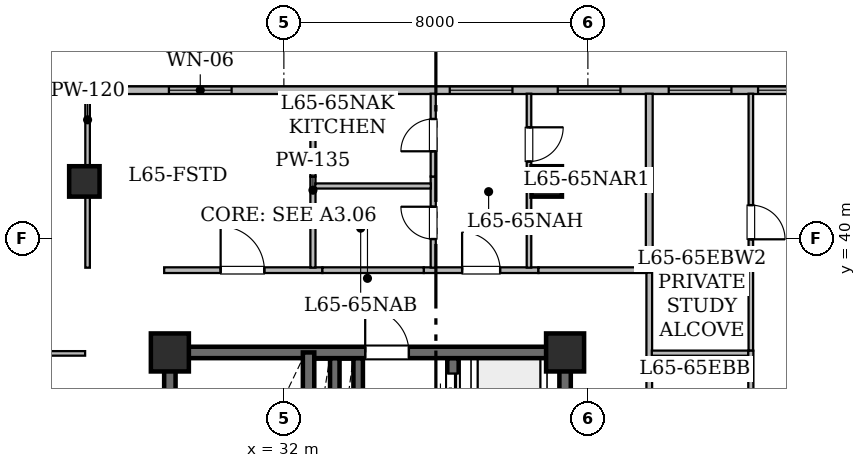
"""IFC4 building model, lengths in metres.
Left out: names, types, materials, properties, quantities, classifications, styles, units other than length and angle.
Written with IfcOpenShell. Run it as: python <this file> out.ifc"""

import sys

from ifc_helpers import new_model, si_unit, direction, frame, frame_2d, origin, origin_2d, place, context, subcontext, project, spatial, rectangle, hollow_rectangle, extrude, element, fill, save


model = new_model("IFC4")
c1 = context("Model", 3, precision=1e-05, world=origin(), true_north=direction((0.0, 1.0)))
c2 = subcontext(c1, "Body", "Model", "MODEL_VIEW")
j1 = project(units=[si_unit("LENGTHUNIT", "METRE"), si_unit("PLANEANGLEUNIT", "RADIAN")], contexts=[c1])
p1 = place(None, origin())
s1 = spatial("IfcSite", under=j1, at=p1, CompositionType="ELEMENT")
p2 = place(p1, origin())
s2 = spatial("IfcBuilding", under=s1, at=p2, CompositionType="ELEMENT")
p3 = place(p2, frame((0.0, 0.0, 253.7)))
s3 = spatial("IfcBuildingStorey", under=s2, at=p3, CompositionType="ELEMENT", Elevation=253.7)
for number, where, z_axis, x_axis in (
    (1, (29.0, 37.0, 0.0), (0.0, 0.0, 1.0), (1.0, 0.0, 0.0)),
    (2, (39.4, 37.0, 0.0), (0.0, 0.0, 1.0), (1.0, 0.0, 0.0)),
):
    element("IfcColumn", number, at=place(p3, frame(where, z_axis=z_axis, x_axis=x_axis)), inside=s3, PredefinedType="COLUMN", context=c2, shape_type="SweptSolid", body=[
        extrude(hollow_rectangle(XDim=1.0, YDim=1.0, WallThickness=0.05, at=origin_2d()), origin(), (0.0, 0.0, 1.0), 3.65),
    ])
for number, where, z_axis, x_axis in (
    (3, (26.75, 41.5, 0.0), (0.0, 0.0, 1.0), (1.0, 0.0, 0.0)),
    (4, (38.917, 41.5, 0.0), (0.0, 0.0, 1.0), (1.0, 0.0, 0.0)),
):
    element("IfcColumn", number, at=place(p3, frame(where, z_axis=z_axis, x_axis=x_axis)), inside=s3, PredefinedType="COLUMN", context=c2, shape_type="SweptSolid", body=[
        extrude(hollow_rectangle(XDim=0.8, YDim=0.8, WallThickness=0.04, at=origin_2d()), origin(), (0.0, 0.0, 1.0), 3.65),
    ])
p4 = place(p3, frame((24.302, 43.9, 0.0), z_axis=(0.0, 0.0, 1.0), x_axis=(1.0, 0.0, 0.0)))
e5 = element("IfcWall", 5, at=p4, inside=s3, PredefinedType="STANDARD", context=c2, shape_type="SweptSolid", body=[
    extrude(rectangle(XDim=41.457, YDim=0.2, at=frame_2d((20.729, 0.0))), origin(), (0.0, 0.0, 1.0), 3.43),
])
p5 = place(p4, frame((4.673, 0.0, 0.85)))
e6 = element("IfcOpeningElement", 6, at=p5, cuts=e5, PredefinedType="OPENING", context=c2, shape_type="SweptSolid", body=[
    extrude(rectangle(XDim=1.65, YDim=1.55, at=frame_2d((0.825, 0.775))), frame((0.0, 0.11, 0.0), z_axis=(0.0, -1.0, 0.0), x_axis=(1.0, 0.0, 0.0)), (0.0, 0.0, 1.0), 0.22),
])
p6 = place(p4, frame((12.063, 0.0, 0.85)))
e7 = element("IfcOpeningElement", 7, at=p6, cuts=e5, PredefinedType="OPENING", context=c2, shape_type="SweptSolid", body=[
    extrude(rectangle(XDim=1.65, YDim=1.55, at=frame_2d((0.825, 0.775))), frame((0.0, 0.11, 0.0), z_axis=(0.0, -1.0, 0.0), x_axis=(1.0, 0.0, 0.0)), (0.0, 0.0, 1.0), 0.22),
])
p7 = place(p4, frame((14.905, 0.0, 0.85)))
e8 = element("IfcOpeningElement", 8, at=p7, cuts=e5, PredefinedType="OPENING", context=c2, shape_type="SweptSolid", body=[
    extrude(rectangle(XDim=1.65, YDim=1.55, at=frame_2d((0.825, 0.775))), frame((0.0, 0.11, 0.0), z_axis=(0.0, -1.0, 0.0), x_axis=(1.0, 0.0, 0.0)), (0.0, 0.0, 1.0), 0.22),
])
p8 = place(p4, frame((17.825, 0.0, 0.85)))
e9 = element("IfcOpeningElement", 9, at=p8, cuts=e5, PredefinedType="OPENING", context=c2, shape_type="SweptSolid", body=[
    extrude(rectangle(XDim=1.65, YDim=1.55, at=frame_2d((0.825, 0.775))), frame((0.0, 0.11, 0.0), z_axis=(0.0, -1.0, 0.0), x_axis=(1.0, 0.0, 0.0)), (0.0, 0.0, 1.0), 0.22),
])
p9 = place(p4, frame((20.176, 0.0, 0.8)))
e10 = element("IfcOpeningElement", 10, at=p9, cuts=e5, PredefinedType="OPENING", context=c2, shape_type="SweptSolid", body=[
    extrude(rectangle(XDim=1.2, YDim=1.5, at=frame_2d((0.6, 0.75))), frame((0.0, 0.11, 0.0), z_axis=(0.0, -1.0, 0.0), x_axis=(1.0, 0.0, 0.0)), (0.0, 0.0, 1.0), 0.22),
])
p10 = place(p4, frame((23.266, 0.0, 0.85)))
e11 = element("IfcOpeningElement", 11, at=p10, cuts=e5, PredefinedType="OPENING", context=c2, shape_type="SweptSolid", body=[
    extrude(rectangle(XDim=1.65, YDim=1.55, at=frame_2d((0.825, 0.775))), frame((0.0, 0.11, 0.0), z_axis=(0.0, -1.0, 0.0), x_axis=(1.0, 0.0, 0.0)), (0.0, 0.0, 1.0), 0.22),
])
p11 = place(p4, frame((27.324, 0.0, 0.85)))
e12 = element("IfcOpeningElement", 12, at=p11, cuts=e5, PredefinedType="OPENING", context=c2, shape_type="SweptSolid", body=[
    extrude(rectangle(XDim=1.65, YDim=1.55, at=frame_2d((0.825, 0.775))), frame((0.0, 0.11, 0.0), z_axis=(0.0, -1.0, 0.0), x_axis=(1.0, 0.0, 0.0)), (0.0, 0.0, 1.0), 0.22),
])
p12 = place(p4, frame((32.408, 0.0, 0.85)))
e13 = element("IfcOpeningElement", 13, at=p12, cuts=e5, PredefinedType="OPENING", context=c2, shape_type="SweptSolid", body=[
    extrude(rectangle(XDim=1.65, YDim=1.55, at=frame_2d((0.825, 0.775))), frame((0.0, 0.11, 0.0), z_axis=(0.0, -1.0, 0.0), x_axis=(1.0, 0.0, 0.0)), (0.0, 0.0, 1.0), 0.22),
])
p13 = place(p3, frame((29.0, 28.0, 0.0), z_axis=(0.0, 0.0, 1.0), x_axis=(0.0, 1.0, 0.0)))
e14 = element("IfcWall", 14, at=p13, inside=s3, PredefinedType="SHEAR", context=c2, shape_type="SweptSolid", body=[
    extrude(rectangle(XDim=9.0, YDim=0.3, at=frame_2d((4.5, 0.0))), origin(), (0.0, 0.0, 1.0), 3.43),
])
p14 = place(p3, frame((29.0, 37.0, 0.0), z_axis=(0.0, 0.0, 1.0), x_axis=(1.0, 0.0, 0.0)))
e15 = element("IfcWall", 15, at=p14, inside=s3, PredefinedType="SHEAR", context=c2, shape_type="SweptSolid", body=[
    extrude(rectangle(XDim=10.4, YDim=0.3, at=frame_2d((5.2, 0.0))), origin(), (0.0, 0.0, 1.0), 3.43),
])
p15 = place(p14, frame((5.14, 0.0, 0.0)))
e16 = element("IfcOpeningElement", 16, at=p15, cuts=e15, PredefinedType="OPENING", context=c2, shape_type="SweptSolid", body=[
    extrude(rectangle(XDim=1.15, YDim=2.2, at=frame_2d((0.575, 1.1))), frame((0.0, 0.16, 0.0), z_axis=(0.0, -1.0, 0.0), x_axis=(1.0, 0.0, 0.0)), (0.0, 0.0, 1.0), 0.32),
])
p16 = place(p3, frame((39.4, 24.4, 0.0), z_axis=(0.0, 0.0, 1.0), x_axis=(0.0, 1.0, 0.0)))
e17 = element("IfcWall", 17, at=p16, inside=s3, PredefinedType="SHEAR", context=c2, shape_type="SweptSolid", body=[
    extrude(rectangle(XDim=12.6, YDim=0.3, at=frame_2d((6.3, 0.0))), origin(), (0.0, 0.0, 1.0), 3.43),
])
p17 = place(p3, frame((32.65, 28.0, 0.0), z_axis=(0.0, 0.0, 1.0), x_axis=(0.0, 1.0, 0.0)))
e18 = element("IfcWall", 18, at=p17, inside=s3, PredefinedType="SHEAR", context=c2, shape_type="SweptSolid", body=[
    extrude(rectangle(XDim=9.0, YDim=0.3, at=frame_2d((4.5, 0.0))), origin(), (0.0, 0.0, 1.0), 3.43),
])
p18 = place(p17, frame((0.72, 0.0, 0.0)))
e19 = element("IfcOpeningElement", 19, at=p18, cuts=e18, PredefinedType="OPENING", context=c2, shape_type="SweptSolid", body=[
    extrude(rectangle(XDim=1.0, YDim=2.15, at=frame_2d((0.5, 1.075))), frame((0.0, 0.16, 0.0), z_axis=(0.0, -1.0, 0.0), x_axis=(1.0, 0.0, 0.0)), (0.0, 0.0, 1.0), 0.32),
])
p19 = place(p3, frame((36.45, 31.25, 0.0), z_axis=(0.0, 0.0, 1.0), x_axis=(0.0, 1.0, 0.0)))
e20 = element("IfcWall", 20, at=p19, inside=s3, PredefinedType="SHEAR", context=c2, shape_type="SweptSolid", body=[
    extrude(rectangle(XDim=5.596, YDim=0.3, at=frame_2d((2.798, 0.0))), origin(), (0.0, 0.0, 1.0), 3.43),
])
p20 = place(p19, frame((0.12, 0.0, 0.0)))
e21 = element("IfcOpeningElement", 21, at=p20, cuts=e20, PredefinedType="OPENING", context=c2, shape_type="SweptSolid", body=[
    extrude(rectangle(XDim=1.05, YDim=2.15, at=frame_2d((0.525, 1.075))), frame((0.0, 0.16, 0.0), z_axis=(0.0, -1.0, 0.0), x_axis=(1.0, 0.0, 0.0)), (0.0, 0.0, 1.0), 0.32),
])
p21 = place(p19, frame((2.125, 0.0, 0.0)))
e22 = element("IfcOpeningElement", 22, at=p21, cuts=e20, PredefinedType="OPENING", context=c2, shape_type="SweptSolid", body=[
    extrude(rectangle(XDim=1.05, YDim=2.15, at=frame_2d((0.525, 1.075))), frame((0.0, 0.16, 0.0), z_axis=(0.0, -1.0, 0.0), x_axis=(1.0, 0.0, 0.0)), (0.0, 0.0, 1.0), 0.32),
])
p22 = place(p19, frame((4.145, 0.0, 0.0)))
e23 = element("IfcOpeningElement", 23, at=p22, cuts=e20, PredefinedType="OPENING", context=c2, shape_type="SweptSolid", body=[
    extrude(rectangle(XDim=1.05, YDim=2.15, at=frame_2d((0.525, 1.075))), frame((0.0, 0.16, 0.0), z_axis=(0.0, -1.0, 0.0), x_axis=(1.0, 0.0, 0.0)), (0.0, 0.0, 1.0), 0.32),
])
p23 = place(p3, frame((33.955, 34.025, 0.0), z_axis=(0.0, 0.0, 1.0), x_axis=(0.0, 1.0, 0.0)))
e24 = element("IfcWall", 24, at=p23, inside=s3, PredefinedType="SHEAR", context=c2, shape_type="SweptSolid", body=[
    extrude(rectangle(XDim=2.821, YDim=0.25, at=frame_2d((1.411, 0.0))), origin(), (0.0, 0.0, 1.0), 3.43),
])
p24 = place(p3, frame((33.34, 34.279, 0.0), z_axis=(0.0, 0.0, 1.0), x_axis=(0.0, 1.0, 0.0)))
e25 = element("IfcWall", 25, at=p24, inside=s3, PredefinedType="SHEAR", context=c2, shape_type="SweptSolid", body=[
    extrude(rectangle(XDim=2.567, YDim=0.25, at=frame_2d((1.283, 0.0))), origin(), (0.0, 0.0, 1.0), 3.43),
])
p25 = place(p3, frame((28.85, 39.165, 0.0), z_axis=(0.0, 0.0, 1.0), x_axis=(1.0, 0.0, 0.0)))
e26 = element("IfcWall", 26, at=p25, inside=s3, PredefinedType="STANDARD", context=c2, shape_type="SweptSolid", body=[
    extrude(rectangle(XDim=4.164, YDim=0.15, at=frame_2d((2.082, 0.0))), origin(), (0.0, 0.0, 1.0), 3.43),
])
p26 = place(p25, frame((1.486, 0.0, 0.0)))
e27 = element("IfcOpeningElement", 27, at=p26, cuts=e26, PredefinedType="OPENING", context=c2, shape_type="SweptSolid", body=[
    extrude(rectangle(XDim=1.15, YDim=2.2, at=frame_2d((0.575, 1.1))), frame((0.0, 0.085, 0.0), z_axis=(0.0, -1.0, 0.0), x_axis=(1.0, 0.0, 0.0)), (0.0, 0.0, 1.0), 0.17),
])
p27 = place(p3, frame((35.681, 39.165, 0.0), z_axis=(0.0, 0.0, 1.0), x_axis=(1.0, 0.0, 0.0)))
e28 = element("IfcWall", 28, at=p27, inside=s3, PredefinedType="STANDARD", context=c2, shape_type="SweptSolid", body=[
    extrude(rectangle(XDim=3.018, YDim=0.15, at=frame_2d((1.509, 0.0))), origin(), (0.0, 0.0, 1.0), 3.43),
])
p28 = place(p27, frame((1.009, 0.0, 0.0)))
e29 = element("IfcOpeningElement", 29, at=p28, cuts=e28, PredefinedType="OPENING", context=c2, shape_type="SweptSolid", body=[
    extrude(rectangle(XDim=1.0, YDim=2.15, at=frame_2d((0.5, 1.075))), frame((0.0, 0.085, 0.0), z_axis=(0.0, -1.0, 0.0), x_axis=(1.0, 0.0, 0.0)), (0.0, 0.0, 1.0), 0.17),
])
p29 = place(p3, frame((33.014, 39.165, 0.0), z_axis=(0.0, 0.0, 1.0), x_axis=(1.0, 0.0, 0.0)))
e30 = element("IfcWall", 30, at=p29, inside=s3, PredefinedType="STANDARD", context=c2, shape_type="SweptSolid", body=[
    extrude(rectangle(XDim=2.667, YDim=0.15, at=frame_2d((1.333, 0.0))), origin(), (0.0, 0.0, 1.0), 3.43),
])
p30 = place(p3, frame((38.699, 39.165, 0.0), z_axis=(0.0, 0.0, 1.0), x_axis=(1.0, 0.0, 0.0)))
e31 = element("IfcWall", 31, at=p30, inside=s3, PredefinedType="STANDARD", context=c2, shape_type="SweptSolid", body=[
    extrude(rectangle(XDim=2.851, YDim=0.15, at=frame_2d((1.426, 0.0))), origin(), (0.0, 0.0, 1.0), 2.725),
])
p31 = place(p3, frame((41.615, 39.1, 0.0), z_axis=(0.0, 0.0, 1.0), x_axis=(0.0, -1.0, 0.0)))
e32 = element("IfcWall", 32, at=p31, inside=s3, PredefinedType="STANDARD", context=c2, shape_type="SweptSolid", body=[
    extrude(rectangle(XDim=2.368, YDim=0.15, at=frame_2d((1.184, 0.0))), origin(), (0.0, 0.0, 1.0), 2.725),
])
p32 = place(p3, frame((41.615, 36.732, 0.0), z_axis=(0.0, 0.0, 1.0), x_axis=(0.0, -1.0, 0.0)))
e33 = element("IfcWall", 33, at=p32, inside=s3, PredefinedType="STANDARD", context=c2, shape_type="SweptSolid", body=[
    extrude(rectangle(XDim=4.467, YDim=0.15, at=frame_2d((2.233, 0.0))), origin(), (0.0, 0.0, 1.0), 3.013),
])
p33 = place(p3, frame((26.835, 39.23, 0.0), z_axis=(0.0, 0.0, 1.0), x_axis=(0.0, 1.0, 0.0)))
e34 = element("IfcWall", 34, at=p33, inside=s3, PredefinedType="PARTITIONING", context=c2, shape_type="SweptSolid", body=[
    extrude(rectangle(XDim=4.578, YDim=0.12, at=frame_2d((2.289, 0.0))), origin(), (0.0, 0.0, 1.0), 2.725),
])
p34 = place(p3, frame((32.765, 41.629, 0.0), z_axis=(0.0, 0.0, 1.0), x_axis=(0.0, -1.0, 0.0)))
e35 = element("IfcWall", 35, at=p34, inside=s3, PredefinedType="PARTITIONING", context=c2, shape_type="SweptSolid", body=[
    extrude(rectangle(XDim=2.397, YDim=0.135, at=frame_2d((1.198, 0.0))), origin(), (0.0, 0.0, 1.0), 2.887),
])
p35 = place(p3, frame((32.765, 43.808, 0.0), z_axis=(0.0, 0.0, 1.0), x_axis=(0.0, -1.0, 0.0)))
e36 = element("IfcWall", 36, at=p35, inside=s3, PredefinedType="PARTITIONING", context=c2, shape_type="SweptSolid", body=[
    extrude(rectangle(XDim=2.179, YDim=0.135, at=frame_2d((1.09, 0.0))), origin(), (0.0, 0.0, 1.0), 3.43),
])
p36 = place(p3, frame((20.392, 36.975, 0.0), z_axis=(0.0, 0.0, 1.0), x_axis=(1.0, 0.0, 0.0)))
e37 = element("IfcWall", 37, at=p36, inside=s3, PredefinedType="PARTITIONING", context=c2, shape_type="SweptSolid", body=[
    extrude(rectangle(XDim=6.378, YDim=0.12, at=frame_2d((3.189, 0.0))), origin(), (0.0, 0.0, 1.0), 2.887),
])
p37 = place(p36, frame((2.739, 0.0, 0.0)))
e38 = element("IfcOpeningElement", 38, at=p37, cuts=e37, PredefinedType="OPENING", context=c2, shape_type="SweptSolid", body=[
    extrude(rectangle(XDim=0.9, YDim=2.1, at=frame_2d((0.45, 1.05))), frame((0.0, 0.07, 0.0), z_axis=(0.0, -1.0, 0.0), x_axis=(1.0, 0.0, 0.0)), (0.0, 0.0, 1.0), 0.14),
])
p38 = place(p3, frame((35.93, 39.232, 0.0), z_axis=(0.0, 0.0, 1.0), x_axis=(0.0, 1.0, 0.0)))
e39 = element("IfcWall", 39, at=p38, inside=s3, PredefinedType="PARTITIONING", context=c2, shape_type="SweptSolid", body=[
    extrude(rectangle(XDim=2.397, YDim=0.135, at=frame_2d((1.198, 0.0))), origin(), (0.0, 0.0, 1.0), 2.887),
])
p39 = place(p38, frame((0.752, 0.0, 0.0)))
e40 = element("IfcOpeningElement", 40, at=p39, cuts=e39, PredefinedType="OPENING", context=c2, shape_type="SweptSolid", body=[
    extrude(rectangle(XDim=0.85, YDim=2.1, at=frame_2d((0.425, 1.05))), frame((0.0, 0.077, 0.0), z_axis=(0.0, -1.0, 0.0), x_axis=(1.0, 0.0, 0.0)), (0.0, 0.0, 1.0), 0.155),
])
p40 = place(p3, frame((35.93, 41.629, 0.0), z_axis=(0.0, 0.0, 1.0), x_axis=(0.0, 1.0, 0.0)))
e41 = element("IfcWall", 41, at=p40, inside=s3, PredefinedType="PARTITIONING", context=c2, shape_type="SweptSolid", body=[
    extrude(rectangle(XDim=2.179, YDim=0.135, at=frame_2d((1.09, 0.0))), origin(), (0.0, 0.0, 1.0), 3.43),
])
p41 = place(p40, frame((0.664, 0.0, 0.0)))
e42 = element("IfcOpeningElement", 42, at=p41, cuts=e41, PredefinedType="OPENING", context=c2, shape_type="SweptSolid", body=[
    extrude(rectangle(XDim=0.85, YDim=2.1, at=frame_2d((0.425, 1.05))), frame((0.0, 0.077, 0.0), z_axis=(0.0, -1.0, 0.0), x_axis=(1.0, 0.0, 0.0)), (0.0, 0.0, 1.0), 0.155),
])
p42 = place(p3, frame((38.45, 43.808, 0.0), z_axis=(0.0, 0.0, 1.0), x_axis=(0.0, -1.0, 0.0)))
e43 = element("IfcWall", 43, at=p42, inside=s3, PredefinedType="PARTITIONING", context=c2, shape_type="SweptSolid", body=[
    extrude(rectangle(XDim=4.576, YDim=0.12, at=frame_2d((2.288, 0.0))), origin(), (0.0, 0.0, 1.0), 2.887),
])
p43 = place(p42, frame((0.884, 0.0, 0.0)))
e44 = element("IfcOpeningElement", 44, at=p43, cuts=e43, PredefinedType="OPENING", context=c2, shape_type="SweptSolid", body=[
    extrude(rectangle(XDim=0.9, YDim=2.1, at=frame_2d((0.45, 1.05))), frame((0.0, 0.07, 0.0), z_axis=(0.0, -1.0, 0.0), x_axis=(1.0, 0.0, 0.0)), (0.0, 0.0, 1.0), 0.14),
])
p44 = place(p3, frame((32.827, 41.38, 0.0), z_axis=(0.0, 0.0, 1.0), x_axis=(1.0, 0.0, 0.0)))
e45 = element("IfcWall", 45, at=p44, inside=s3, PredefinedType="PARTITIONING", context=c2, shape_type="SweptSolid", body=[
    extrude(rectangle(XDim=3.041, YDim=0.135, at=frame_2d((1.521, 0.0))), origin(), (0.0, 0.0, 1.0), 2.887),
])
p45 = place(p3, frame((41.615, 43.808, 0.0), z_axis=(0.0, 0.0, 1.0), x_axis=(0.0, -1.0, 0.0)))
e46 = element("IfcWall", 46, at=p45, inside=s3, PredefinedType="STANDARD", context=c2, shape_type="SweptSolid", body=[
    extrude(rectangle(XDim=4.578, YDim=0.18, at=frame_2d((2.289, 0.0))), origin(), (0.0, 0.0, 1.0), 2.887),
])
p46 = place(p3, frame((44.288, 43.808, 0.0), z_axis=(0.0, 0.0, 1.0), x_axis=(0.0, -1.0, 0.0)))
e47 = element("IfcWall", 47, at=p46, inside=s3, PredefinedType="PARTITIONING", context=c2, shape_type="SweptSolid", body=[
    extrude(rectangle(XDim=6.762, YDim=0.12, at=frame_2d((3.381, 0.0))), origin(), (0.0, 0.0, 1.0), 2.725),
])
p47 = place(p46, frame((2.931, 0.0, 0.0)))
e48 = element("IfcOpeningElement", 48, at=p47, cuts=e47, PredefinedType="OPENING", context=c2, shape_type="SweptSolid", body=[
    extrude(rectangle(XDim=0.9, YDim=2.1, at=frame_2d((0.45, 1.05))), frame((0.0, 0.07, 0.0), z_axis=(0.0, -1.0, 0.0), x_axis=(1.0, 0.0, 0.0)), (0.0, 0.0, 1.0), 0.14),
])
p48 = place(p3, frame((44.223, 36.981, 0.0), z_axis=(0.0, 0.0, 1.0), x_axis=(-1.0, 0.0, 0.0)))
e49 = element("IfcWall", 49, at=p48, inside=s3, PredefinedType="PARTITIONING", context=c2, shape_type="SweptSolid", body=[
    extrude(rectangle(XDim=2.541, YDim=0.135, at=frame_2d((1.271, 0.0))), origin(), (0.0, 0.0, 1.0), 2.725),
])
p49 = place(p3, frame((44.288, 31.951, 0.0), z_axis=(0.0, 0.0, 1.0), x_axis=(0.0, 1.0, 0.0)))
e50 = element("IfcWall", 50, at=p49, inside=s3, PredefinedType="PARTITIONING", context=c2, shape_type="SweptSolid", body=[
    extrude(rectangle(XDim=5.095, YDim=0.135, at=frame_2d((2.547, 0.0))), origin(), (0.0, 0.0, 1.0), 3.013),
])
p50 = place(p49, frame((2.123, 0.0, 0.0)))
e51 = element("IfcOpeningElement", 51, at=p50, cuts=e50, PredefinedType="OPENING", context=c2, shape_type="SweptSolid", body=[
    extrude(rectangle(XDim=0.85, YDim=2.1, at=frame_2d((0.425, 1.05))), frame((0.0, 0.077, 0.0), z_axis=(0.0, -1.0, 0.0), x_axis=(1.0, 0.0, 0.0)), (0.0, 0.0, 1.0), 0.155),
])
p51 = place(p5, origin())
e52 = element("IfcWindow", 52, at=p51, inside=s3, PartitioningType="SINGLE_PANEL", PredefinedType="WINDOW", context=c2, shape_type="SweptSolid", body=[
    extrude(rectangle(XDim=1.65, YDim=1.55, at=frame_2d((0.825, 0.775))), frame((0.0, 0.03, 0.0), z_axis=(0.0, -1.0, 0.0), x_axis=(1.0, 0.0, 0.0)), (0.0, 0.0, 1.0), 0.06),
])
fill(e6, e52)
p52 = place(p6, origin())
e53 = element("IfcWindow", 53, at=p52, inside=s3, PartitioningType="SINGLE_PANEL", PredefinedType="WINDOW", context=c2, shape_type="SweptSolid", body=[
    extrude(rectangle(XDim=1.65, YDim=1.55, at=frame_2d((0.825, 0.775))), frame((0.0, 0.03, 0.0), z_axis=(0.0, -1.0, 0.0), x_axis=(1.0, 0.0, 0.0)), (0.0, 0.0, 1.0), 0.06),
])
fill(e7, e53)
p53 = place(p7, origin())
e54 = element("IfcWindow", 54, at=p53, inside=s3, PartitioningType="SINGLE_PANEL", PredefinedType="WINDOW", context=c2, shape_type="SweptSolid", body=[
    extrude(rectangle(XDim=1.65, YDim=1.55, at=frame_2d((0.825, 0.775))), frame((0.0, 0.03, 0.0), z_axis=(0.0, -1.0, 0.0), x_axis=(1.0, 0.0, 0.0)), (0.0, 0.0, 1.0), 0.06),
])
fill(e8, e54)
p54 = place(p8, origin())
e55 = element("IfcWindow", 55, at=p54, inside=s3, PartitioningType="SINGLE_PANEL", PredefinedType="WINDOW", context=c2, shape_type="SweptSolid", body=[
    extrude(rectangle(XDim=1.65, YDim=1.55, at=frame_2d((0.825, 0.775))), frame((0.0, 0.03, 0.0), z_axis=(0.0, -1.0, 0.0), x_axis=(1.0, 0.0, 0.0)), (0.0, 0.0, 1.0), 0.06),
])
fill(e9, e55)
p55 = place(p9, origin())
e56 = element("IfcWindow", 56, at=p55, inside=s3, PartitioningType="SINGLE_PANEL", PredefinedType="WINDOW", context=c2, shape_type="SweptSolid", body=[
    extrude(rectangle(XDim=1.2, YDim=1.5, at=frame_2d((0.6, 0.75))), frame((0.0, 0.03, 0.0), z_axis=(0.0, -1.0, 0.0), x_axis=(1.0, 0.0, 0.0)), (0.0, 0.0, 1.0), 0.06),
])
fill(e10, e56)
p56 = place(p15, origin())
e57 = element("IfcDoor", 57, at=p56, inside=s3, OperationType="SINGLE_SWING_LEFT", PredefinedType="DOOR", context=c2, shape_type="SweptSolid", body=[
    extrude(rectangle(XDim=1.15, YDim=2.2, at=frame_2d((0.575, 1.1))), frame((0.0, 0.025, 0.0), z_axis=(0.0, -1.0, 0.0), x_axis=(1.0, 0.0, 0.0)), (0.0, 0.0, 1.0), 0.05),
])
fill(e16, e57)
p57 = place(p22, origin())
e58 = element("IfcDoor", 58, at=p57, inside=s3, OperationType="SLIDING_TO_LEFT", PredefinedType="DOOR", context=c2, shape_type="SweptSolid", body=[
    extrude(rectangle(XDim=1.05, YDim=2.15, at=frame_2d((0.525, 1.075))), frame((0.0, 0.025, 0.0), z_axis=(0.0, -1.0, 0.0), x_axis=(1.0, 0.0, 0.0)), (0.0, 0.0, 1.0), 0.05),
])
fill(e23, e58)
p58 = place(p26, origin())
e59 = element("IfcDoor", 59, at=p58, inside=s3, OperationType="SINGLE_SWING_LEFT", PredefinedType="DOOR", context=c2, shape_type="SweptSolid", body=[
    extrude(rectangle(XDim=1.15, YDim=2.2, at=frame_2d((0.575, 1.1))), frame((0.0, 0.025, 0.0), z_axis=(0.0, -1.0, 0.0), x_axis=(1.0, 0.0, 0.0)), (0.0, 0.0, 1.0), 0.05),
])
fill(e27, e59)
p59 = place(p28, origin())
e60 = element("IfcDoor", 60, at=p59, inside=s3, OperationType="SINGLE_SWING_LEFT", PredefinedType="DOOR", context=c2, shape_type="SweptSolid", body=[
    extrude(rectangle(XDim=1.0, YDim=2.15, at=frame_2d((0.5, 1.075))), frame((0.0, 0.025, 0.0), z_axis=(0.0, -1.0, 0.0), x_axis=(1.0, 0.0, 0.0)), (0.0, 0.0, 1.0), 0.05),
])
fill(e29, e60)
p60 = place(p39, origin())
e61 = element("IfcDoor", 61, at=p60, inside=s3, OperationType="SINGLE_SWING_RIGHT", PredefinedType="DOOR", context=c2, shape_type="SweptSolid", body=[
    extrude(rectangle(XDim=0.85, YDim=2.1, at=frame_2d((0.425, 1.05))), frame((0.0, 0.025, 0.0), z_axis=(0.0, -1.0, 0.0), x_axis=(1.0, 0.0, 0.0)), (0.0, 0.0, 1.0), 0.05),
])
fill(e40, e61)
p61 = place(p41, origin())
e62 = element("IfcDoor", 62, at=p61, inside=s3, OperationType="SINGLE_SWING_LEFT", PredefinedType="DOOR", context=c2, shape_type="SweptSolid", body=[
    extrude(rectangle(XDim=0.85, YDim=2.1, at=frame_2d((0.425, 1.05))), frame((0.0, 0.025, 0.0), z_axis=(0.0, -1.0, 0.0), x_axis=(1.0, 0.0, 0.0)), (0.0, 0.0, 1.0), 0.05),
])
fill(e42, e62)
p62 = place(p43, origin())
e63 = element("IfcDoor", 63, at=p62, inside=s3, OperationType="SINGLE_SWING_LEFT", PredefinedType="DOOR", context=c2, shape_type="SweptSolid", body=[
    extrude(rectangle(XDim=0.9, YDim=2.1, at=frame_2d((0.45, 1.05))), frame((0.0, 0.025, 0.0), z_axis=(0.0, -1.0, 0.0), x_axis=(1.0, 0.0, 0.0)), (0.0, 0.0, 1.0), 0.05),
])
fill(e44, e63)
p63 = place(p47, origin())
e64 = element("IfcDoor", 64, at=p63, inside=s3, OperationType="SINGLE_SWING_RIGHT", PredefinedType="DOOR", context=c2, shape_type="SweptSolid", body=[
    extrude(rectangle(XDim=0.9, YDim=2.1, at=frame_2d((0.45, 1.05))), frame((0.0, 0.025, 0.0), z_axis=(0.0, -1.0, 0.0), x_axis=(1.0, 0.0, 0.0)), (0.0, 0.0, 1.0), 0.05),
])
fill(e48, e64)
save(model, sys.argv[1])
